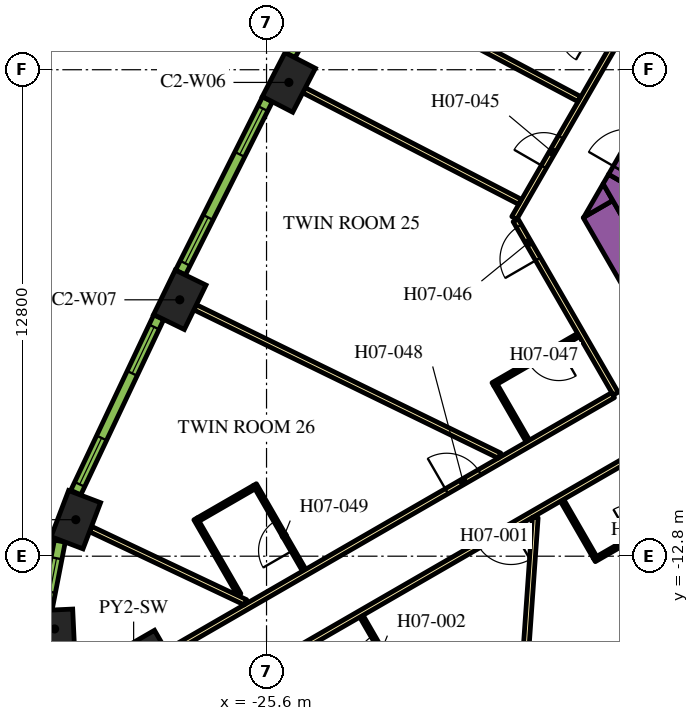
"""IFC4 building model, lengths in metres.
Left out: names, types, materials, properties, quantities, classifications, styles, units other than length and angle.
Written with IfcOpenShell. Run it as: python <this file> out.ifc"""

import sys

from ifc_helpers import new_model, si_unit, direction, frame, frame_2d, origin, origin_2d, place, context, subcontext, project, spatial, polyline, rectangle, outline, extrude, element, fill, save


model = new_model("IFC4")
c1 = context("Model", 3, precision=1e-05, world=origin(), true_north=direction((0.0, 1.0)))
c2 = subcontext(c1, "Body", "Model", "MODEL_VIEW")
j1 = project(units=[si_unit("LENGTHUNIT", "METRE"), si_unit("PLANEANGLEUNIT", "RADIAN")], contexts=[c1])
p1 = place(None, origin())
s1 = spatial("IfcSite", under=j1, at=p1, CompositionType="ELEMENT")
p2 = place(p1, origin())
s2 = spatial("IfcBuilding", under=s1, at=p2, CompositionType="ELEMENT")
p3 = place(p2, frame((0.0, 0.0, 103.2)))
s3 = spatial("IfcBuildingStorey", under=s2, at=p3, CompositionType="ELEMENT", Elevation=103.2)
p4 = place(p3, frame((-29.097, -16.799, 0.0), z_axis=(0.0, 0.0, 1.0), x_axis=(-0.866025403784, -0.5, 0.0)))
e1 = element("IfcColumn", 1, at=p4, inside=s3, PredefinedType="COLUMN", context=c2, shape_type="SweptSolid", body=[
    extrude(rectangle(XDim=3.0, YDim=3.0, at=origin_2d()), origin(), (0.0, 0.0, 1.0), 3.9),
])
for number, where, z_axis, x_axis in (
    (2, (-25.012, -0.334, 0.0), (0.0, 0.0, 1.0), (-0.459, -0.888, 0.0)),
    (3, (-27.883, -6.054, 0.0), (0.0, 0.0, 1.0), (-0.438, -0.899, 0.0)),
    (4, (-30.619, -11.839, 0.0), (0.0, 0.0, 1.0), (-0.355, -0.935, 0.0)),
):
    element("IfcColumn", number, at=place(p3, frame(where, z_axis=z_axis, x_axis=x_axis)), inside=s3, PredefinedType="COLUMN", context=c2, shape_type="SweptSolid", body=[
        extrude(rectangle(XDim=1.3, YDim=0.9, at=origin_2d()), origin(), (0.0, 0.0, 1.0), 3.9),
    ])
p5 = place(p3, frame((-31.177, -14.714, 0.0), z_axis=(0.0, 0.0, 1.0), x_axis=(0.046756026083, -0.998906338965, 0.0)))
e5 = element("IfcColumn", 5, at=p5, inside=s3, PredefinedType="COLUMN", context=c2, shape_type="SweptSolid", body=[
    extrude(rectangle(XDim=1.0, YDim=1.0, at=origin_2d()), origin(), (0.0, 0.0, 1.0), 3.9),
])
p6 = place(p3, frame((-12.134, -11.883, 0.0), z_axis=(0.0, 0.0, 1.0), x_axis=(-0.500005339912, 0.866022320763, 0.0)))
e6 = element("IfcWall", 6, at=p6, inside=s3, PredefinedType="SOLIDWALL", context=c2, shape_type="SweptSolid", body=[
    extrude(rectangle(XDim=9.488, YDim=0.9, at=frame_2d((4.744, 0.0))), origin(), (0.0, 0.0, 1.0), 3.9),
])
p7 = place(p3, origin())
e7 = element("IfcWall", 7, at=p7, inside=s3, PredefinedType="SOLIDWALL", context=c2, shape_type="SweptSolid", body=[
    extrude(outline(polyline([(-16.489, -3.44), (-17.251, -3.88), (-16.743, -3.0), (-16.489, -3.44)])), origin(), (0.0, 0.0, 1.0), 3.9),
])
e8 = element("IfcWall", 8, at=p7, inside=s3, PredefinedType="SOLIDWALL", context=c2, shape_type="SweptSolid", body=[
    extrude(outline(polyline([(-15.82, -3.201), (-16.223, -3.9), (-16.743, -3.0), (-16.599, -2.751), (-15.82, -3.201)])), origin(), (0.0, 0.0, 1.0), 3.9),
])
p8 = place(p3, frame((-16.209, -2.976, 0.0), z_axis=(0.0, 0.0, 1.0), x_axis=(0.499954529098, 0.86605165483, 0.0)))
e9 = element("IfcWall", 9, at=p8, inside=s3, PredefinedType="SOLIDWALL", context=c2, shape_type="SweptSolid", body=[
    extrude(rectangle(XDim=1.7, YDim=0.9, at=frame_2d((0.85, 0.0))), origin(), (0.0, 0.0, 1.0), 3.9),
])
p9 = place(p8, frame((0.25, 0.0, 0.0)))
e10 = element("IfcOpeningElement", 10, at=p9, cuts=e9, PredefinedType="OPENING", context=c2, shape_type="SweptSolid", body=[
    extrude(rectangle(XDim=1.2, YDim=2.1, at=frame_2d((0.6, 1.05))), frame((0.0, 0.46, 0.0), z_axis=(0.0, -1.0, 0.0), x_axis=(1.0, 0.0, 0.0)), (0.0, 0.0, 1.0), 0.92),
])
p10 = place(p3, frame((-19.081, -3.9, 0.0), z_axis=(0.0, 0.0, 1.0), x_axis=(0.499998313975, 0.866026377209, 0.0)))
e11 = element("IfcWall", 11, at=p10, inside=s3, PredefinedType="PARTITIONING", context=c2, shape_type="SweptSolid", body=[
    extrude(rectangle(XDim=25.766, YDim=0.15, at=frame_2d((12.883, 0.0))), origin(), (0.0, 0.0, 1.0), 2.75),
])
p11 = place(p10, frame((19.306, 0.0, 0.0)))
e12 = element("IfcOpeningElement", 12, at=p11, cuts=e11, PredefinedType="OPENING", context=c2, shape_type="SweptSolid", body=[
    extrude(rectangle(XDim=1.0, YDim=2.1, at=frame_2d((0.5, 1.05))), frame((0.0, 0.085, 0.0), z_axis=(0.0, -1.0, 0.0), x_axis=(1.0, 0.0, 0.0)), (0.0, 0.0, 1.0), 0.17),
])
p12 = place(p10, frame((17.144, 0.0, 0.0)))
e13 = element("IfcOpeningElement", 13, at=p12, cuts=e11, PredefinedType="OPENING", context=c2, shape_type="SweptSolid", body=[
    extrude(rectangle(XDim=0.9, YDim=2.1, at=frame_2d((0.45, 1.05))), frame((0.0, 0.085, 0.0), z_axis=(0.0, -1.0, 0.0), x_axis=(1.0, 0.0, 0.0)), (0.0, 0.0, 1.0), 0.17),
])
p13 = place(p10, frame((9.955, 0.0, 0.0)))
e14 = element("IfcOpeningElement", 14, at=p13, cuts=e11, PredefinedType="OPENING", context=c2, shape_type="SweptSolid", body=[
    extrude(rectangle(XDim=1.1, YDim=2.1, at=frame_2d((0.55, 1.05))), frame((0.0, 0.085, 0.0), z_axis=(0.0, -1.0, 0.0), x_axis=(1.0, 0.0, 0.0)), (0.0, 0.0, 1.0), 0.17),
])
p14 = place(p10, frame((8.648, 0.0, 0.0)))
e15 = element("IfcOpeningElement", 15, at=p14, cuts=e11, PredefinedType="OPENING", context=c2, shape_type="SweptSolid", body=[
    extrude(rectangle(XDim=1.0, YDim=2.1, at=frame_2d((0.5, 1.05))), frame((0.0, 0.085, 0.0), z_axis=(0.0, -1.0, 0.0), x_axis=(1.0, 0.0, 0.0)), (0.0, 0.0, 1.0), 0.17),
])
p15 = place(p10, frame((1.553, 0.0, 0.0)))
e16 = element("IfcOpeningElement", 16, at=p15, cuts=e11, PredefinedType="OPENING", context=c2, shape_type="SweptSolid", body=[
    extrude(rectangle(XDim=0.9, YDim=2.1, at=frame_2d((0.45, 1.05))), frame((0.0, 0.085, 0.0), z_axis=(0.0, -1.0, 0.0), x_axis=(1.0, 0.0, 0.0)), (0.0, 0.0, 1.0), 0.17),
])
p16 = place(p3, frame((-16.412, -8.523, 0.0), z_axis=(0.0, 0.0, 1.0), x_axis=(-0.500001929737, 0.866024289647, 0.0)))
e17 = element("IfcWall", 17, at=p16, inside=s3, PredefinedType="PARTITIONING", context=c2, shape_type="SweptSolid", body=[
    extrude(rectangle(XDim=5.268, YDim=0.15, at=frame_2d((2.634, 0.0))), origin(), (0.0, 0.0, 1.0), 2.75),
])
p17 = place(p16, frame((4.088, 0.0, 0.0)))
e18 = element("IfcOpeningElement", 18, at=p17, cuts=e17, PredefinedType="OPENING", context=c2, shape_type="SweptSolid", body=[
    extrude(rectangle(XDim=1.0, YDim=2.1, at=frame_2d((0.5, 1.05))), frame((0.0, 0.085, 0.0), z_axis=(0.0, -1.0, 0.0), x_axis=(1.0, 0.0, 0.0)), (0.0, 0.0, 1.0), 0.17),
])
p18 = place(p3, frame((-28.211, -15.335, 0.0), z_axis=(0.0, 0.0, 1.0), x_axis=(0.866025884867, 0.49999916674, 0.0)))
e19 = element("IfcWall", 19, at=p18, inside=s3, PredefinedType="PARTITIONING", context=c2, shape_type="SweptSolid", body=[
    extrude(rectangle(XDim=13.543, YDim=0.15, at=frame_2d((6.772, 0.0))), origin(), (0.0, 0.0, 1.0), 2.75),
])
p19 = place(p18, frame((8.488, 0.0, 0.0)))
e20 = element("IfcOpeningElement", 20, at=p19, cuts=e19, PredefinedType="OPENING", context=c2, shape_type="SweptSolid", body=[
    extrude(rectangle(XDim=1.0, YDim=2.1, at=frame_2d((0.5, 1.05))), frame((0.0, 0.085, 0.0), z_axis=(0.0, -1.0, 0.0), x_axis=(1.0, 0.0, 0.0)), (0.0, 0.0, 1.0), 0.17),
])
p20 = place(p3, frame((-15.587, -9.952, 0.0), z_axis=(0.0, 0.0, 1.0), x_axis=(-0.866017869832, -0.500013048961, 0.0)))
e21 = element("IfcWall", 21, at=p20, inside=s3, PredefinedType="PARTITIONING", context=c2, shape_type="SweptSolid", body=[
    extrude(rectangle(XDim=13.624, YDim=0.15, at=frame_2d((6.812, 0.0))), origin(), (0.0, 0.0, 1.0), 2.75),
])
p21 = place(p20, frame((4.134, 0.0, 0.0)))
e22 = element("IfcOpeningElement", 22, at=p21, cuts=e21, PredefinedType="OPENING", context=c2, shape_type="SweptSolid", body=[
    extrude(rectangle(XDim=1.0, YDim=2.1, at=frame_2d((0.5, 1.05))), frame((0.0, 0.085, 0.0), z_axis=(0.0, -1.0, 0.0), x_axis=(1.0, 0.0, 0.0)), (0.0, 0.0, 1.0), 0.17),
])
p22 = place(p3, frame((-30.231, -12.085, 0.0), z_axis=(0.0, 0.0, 1.0), x_axis=(0.904001132572, -0.427530060122, 0.0)))
e23 = element("IfcWall", 23, at=p22, inside=s3, PredefinedType="PARTITIONING", context=c2, shape_type="SweptSolid", body=[
    extrude(rectangle(XDim=4.51, YDim=0.15, at=frame_2d((2.255, 0.0))), origin(), (0.0, 0.0, 1.0), 2.75),
])
p23 = place(p3, frame((-27.479, -6.251, 0.0), z_axis=(0.0, 0.0, 1.0), x_axis=(0.898945877276, -0.438059710231, 0.0)))
e24 = element("IfcWall", 24, at=p23, inside=s3, PredefinedType="PARTITIONING", context=c2, shape_type="SweptSolid", body=[
    extrude(rectangle(XDim=8.909, YDim=0.15, at=frame_2d((4.455, 0.0))), origin(), (0.0, 0.0, 1.0), 2.75),
])
p24 = place(p3, frame((-24.613, -0.541, 0.0), z_axis=(0.0, 0.0, 1.0), x_axis=(0.888459912519, -0.458954228487, 0.0)))
e25 = element("IfcWall", 25, at=p24, inside=s3, PredefinedType="PARTITIONING", context=c2, shape_type="SweptSolid", body=[
    extrude(rectangle(XDim=6.392, YDim=0.15, at=frame_2d((3.196, 0.0))), origin(), (0.0, 0.0, 1.0), 2.75),
])
p25 = place(p3, frame((-19.153, -20.671, 0.0), z_axis=(0.0, 0.0, 1.0), x_axis=(0.070070736723, 0.997542025107, 0.0)))
e26 = element("IfcWall", 26, at=p25, inside=s3, PredefinedType="PARTITIONING", context=c2, shape_type="SweptSolid", body=[
    extrude(rectangle(XDim=8.909, YDim=0.15, at=frame_2d((4.455, 0.0))), origin(), (0.0, 0.0, 1.0), 2.75),
])
p26 = place(p3, frame((-23.652, 2.567, 0.0), z_axis=(0.0, 0.0, 1.0), x_axis=(0.883019237957, -0.469336793144, 0.0)))
e27 = element("IfcWall", 27, at=p26, inside=s3, PredefinedType="PARTITIONING", context=c2, shape_type="SweptSolid", body=[
    extrude(rectangle(XDim=7.111, YDim=0.15, at=frame_2d((3.555, 0.0))), origin(), (0.0, 0.0, 1.0), 2.75),
])
p27 = place(p3, frame((-21.704, -16.803, 0.0), z_axis=(0.0, 0.0, 1.0), x_axis=(-0.500049511043, 0.865996816683, 0.0)))
e28 = element("IfcWall", 28, at=p27, inside=s3, PredefinedType="PARTITIONING", context=c2, shape_type="SweptSolid", body=[
    extrude(rectangle(XDim=2.8, YDim=0.1, at=frame_2d((1.4, 0.0))), origin(), (0.0, 0.0, 1.0), 2.75),
])
p28 = place(p27, frame((1.3, 0.0, 0.0)))
e29 = element("IfcOpeningElement", 29, at=p28, cuts=e28, PredefinedType="OPENING", context=c2, shape_type="SweptSolid", body=[
    extrude(rectangle(XDim=0.9, YDim=2.1, at=frame_2d((0.45, 1.05))), frame((0.0, 0.06, 0.0), z_axis=(0.0, -1.0, 0.0), x_axis=(1.0, 0.0, 0.0)), (0.0, 0.0, 1.0), 0.12),
])
p29 = place(p3, frame((-16.974, -12.9, 0.0), z_axis=(0.0, 0.0, 1.0), x_axis=(0.865997922154, 0.500047596559, 0.0)))
e30 = element("IfcWall", 30, at=p29, inside=s3, PredefinedType="PARTITIONING", context=c2, shape_type="SweptSolid", body=[
    extrude(rectangle(XDim=2.6, YDim=0.1, at=frame_2d((1.3, 0.0))), origin(), (0.0, 0.0, 1.0), 2.75),
])
p30 = place(p29, frame((1.1, 0.0, 0.0)))
e31 = element("IfcOpeningElement", 31, at=p30, cuts=e30, PredefinedType="OPENING", context=c2, shape_type="SweptSolid", body=[
    extrude(rectangle(XDim=0.9, YDim=2.1, at=frame_2d((0.45, 1.05))), frame((0.0, 0.06, 0.0), z_axis=(0.0, -1.0, 0.0), x_axis=(1.0, 0.0, 0.0)), (0.0, 0.0, 1.0), 0.12),
])
p31 = place(p3, frame((-16.956, -12.832, 0.0), z_axis=(0.0, 0.0, 1.0), x_axis=(-0.499978980201, 0.866037539231, 0.0)))
e32 = element("IfcWall", 32, at=p31, inside=s3, PredefinedType="PARTITIONING", context=c2, shape_type="SweptSolid", body=[
    extrude(rectangle(XDim=1.73, YDim=0.1, at=frame_2d((0.865, 0.0))), origin(), (0.0, 0.0, 1.0), 2.75),
])
p32 = place(p3, frame((-17.39, -6.979, 0.0), z_axis=(0.0, 0.0, 1.0), x_axis=(-0.866021400173, -0.500006934395, 0.0)))
e33 = element("IfcWall", 33, at=p32, inside=s3, PredefinedType="PARTITIONING", context=c2, shape_type="SweptSolid", body=[
    extrude(rectangle(XDim=2.6, YDim=0.1, at=frame_2d((1.3, 0.0))), origin(), (0.0, 0.0, 1.0), 2.75),
])
p33 = place(p32, frame((0.6, 0.0, 0.0)))
e34 = element("IfcOpeningElement", 34, at=p33, cuts=e33, PredefinedType="OPENING", context=c2, shape_type="SweptSolid", body=[
    extrude(rectangle(XDim=0.9, YDim=2.1, at=frame_2d((0.45, 1.05))), frame((0.0, 0.06, 0.0), z_axis=(0.0, -1.0, 0.0), x_axis=(1.0, 0.0, 0.0)), (0.0, 0.0, 1.0), 0.12),
])
p34 = place(p3, frame((-19.574, -8.297, 0.0), z_axis=(0.0, 0.0, 1.0), x_axis=(0.500062241894, -0.865989465428, 0.0)))
e35 = element("IfcWall", 35, at=p34, inside=s3, PredefinedType="PARTITIONING", context=c2, shape_type="SweptSolid", body=[
    extrude(rectangle(XDim=1.7, YDim=0.1, at=frame_2d((0.85, 0.0))), origin(), (0.0, 0.0, 1.0), 2.75),
])
p35 = place(p3, frame((-24.61, -13.169, 0.0), z_axis=(0.0, 0.0, 1.0), x_axis=(-0.500006934395, 0.866021400173, 0.0)))
e36 = element("IfcWall", 36, at=p35, inside=s3, PredefinedType="PARTITIONING", context=c2, shape_type="SweptSolid", body=[
    extrude(rectangle(XDim=2.6, YDim=0.1, at=frame_2d((1.3, 0.0))), origin(), (0.0, 0.0, 1.0), 2.75),
])
p36 = place(p35, frame((0.6, 0.0, 0.0)))
e37 = element("IfcOpeningElement", 37, at=p36, cuts=e36, PredefinedType="OPENING", context=c2, shape_type="SweptSolid", body=[
    extrude(rectangle(XDim=0.9, YDim=2.1, at=frame_2d((0.45, 1.05))), frame((0.0, 0.06, 0.0), z_axis=(0.0, -1.0, 0.0), x_axis=(1.0, 0.0, 0.0)), (0.0, 0.0, 1.0), 0.12),
])
p37 = place(p3, frame((-25.928, -10.986, 0.0), z_axis=(0.0, 0.0, 1.0), x_axis=(-0.865989465428, -0.500062241894, 0.0)))
e38 = element("IfcWall", 38, at=p37, inside=s3, PredefinedType="PARTITIONING", context=c2, shape_type="SweptSolid", body=[
    extrude(rectangle(XDim=1.7, YDim=0.1, at=frame_2d((0.85, 0.0))), origin(), (0.0, 0.0, 1.0), 2.75),
])
p38 = place(p3, frame((-26.319, -13.81, 0.0), z_axis=(0.0, 0.0, 1.0), x_axis=(-0.499952165731, 0.866053019151, 0.0)))
e39 = element("IfcWall", 39, at=p38, inside=s3, PredefinedType="PARTITIONING", context=c2, shape_type="SweptSolid", body=[
    extrude(rectangle(XDim=2.3, YDim=0.1, at=frame_2d((1.15, 0.0))), origin(), (0.0, 0.0, 1.0), 2.75),
])
p39 = place(p3, frame((-22.583, 4.887, 0.0), z_axis=(0.0, 0.0, 1.0), x_axis=(-0.469323203119, -0.883026461106, 0.0)))
e40 = element("IfcWall", 40, at=p39, inside=s3, PredefinedType="SOLIDWALL", context=c2, shape_type="SweptSolid", body=[
    extrude(rectangle(XDim=5.101, YDim=0.29, at=frame_2d((2.55, 0.0))), origin(), (0.0, 0.0, 1.0), 3.65),
])
p40 = place(p39, frame((0.273, 0.0, 0.9)))
e41 = element("IfcOpeningElement", 41, at=p40, cuts=e40, PredefinedType="OPENING", context=c2, shape_type="SweptSolid", body=[
    extrude(rectangle(XDim=1.35, YDim=2.15, at=frame_2d((0.675, 1.075))), frame((0.0, 0.155, 0.0), z_axis=(0.0, -1.0, 0.0), x_axis=(1.0, 0.0, 0.0)), (0.0, 0.0, 1.0), 0.31),
])
p41 = place(p39, frame((3.478, 0.0, 0.9)))
e42 = element("IfcOpeningElement", 42, at=p41, cuts=e40, PredefinedType="OPENING", context=c2, shape_type="SweptSolid", body=[
    extrude(rectangle(XDim=1.35, YDim=2.15, at=frame_2d((0.675, 1.075))), frame((0.0, 0.155, 0.0), z_axis=(0.0, -1.0, 0.0), x_axis=(1.0, 0.0, 0.0)), (0.0, 0.0, 1.0), 0.31),
])
p42 = place(p3, frame((-25.576, -0.778, 0.0), z_axis=(0.0, 0.0, 1.0), x_axis=(-0.448534297211, -0.893765620409, 0.0)))
e43 = element("IfcWall", 43, at=p42, inside=s3, PredefinedType="SOLIDWALL", context=c2, shape_type="SweptSolid", body=[
    extrude(rectangle(XDim=5.1, YDim=0.29, at=frame_2d((2.55, 0.0))), origin(), (0.0, 0.0, 1.0), 3.65),
])
p43 = place(p42, frame((0.272, 0.0, 0.9)))
e44 = element("IfcOpeningElement", 44, at=p43, cuts=e43, PredefinedType="OPENING", context=c2, shape_type="SweptSolid", body=[
    extrude(rectangle(XDim=1.35, YDim=2.15, at=frame_2d((0.675, 1.075))), frame((0.0, 0.155, 0.0), z_axis=(0.0, -1.0, 0.0), x_axis=(1.0, 0.0, 0.0)), (0.0, 0.0, 1.0), 0.31),
])
p44 = place(p42, frame((3.478, 0.0, 0.9)))
e45 = element("IfcOpeningElement", 45, at=p44, cuts=e43, PredefinedType="OPENING", context=c2, shape_type="SweptSolid", body=[
    extrude(rectangle(XDim=1.35, YDim=2.15, at=frame_2d((0.675, 1.075))), frame((0.0, 0.155, 0.0), z_axis=(0.0, -1.0, 0.0), x_axis=(1.0, 0.0, 0.0)), (0.0, 0.0, 1.0), 0.31),
])
p45 = place(p3, frame((-28.436, -6.511, 0.0), z_axis=(0.0, 0.0, 1.0), x_axis=(-0.427543726596, -0.903994669148, 0.0)))
e46 = element("IfcWall", 46, at=p45, inside=s3, PredefinedType="SOLIDWALL", context=c2, shape_type="SweptSolid", body=[
    extrude(rectangle(XDim=5.107, YDim=0.29, at=frame_2d((2.553, 0.0))), origin(), (0.0, 0.0, 1.0), 3.65),
])
p46 = place(p45, frame((0.285, 0.0, 0.9)))
e47 = element("IfcOpeningElement", 47, at=p46, cuts=e46, PredefinedType="OPENING", context=c2, shape_type="SweptSolid", body=[
    extrude(rectangle(XDim=1.35, YDim=2.15, at=frame_2d((0.675, 1.075))), frame((0.0, 0.155, 0.0), z_axis=(0.0, -1.0, 0.0), x_axis=(1.0, 0.0, 0.0)), (0.0, 0.0, 1.0), 0.31),
])
p47 = place(p45, frame((3.516, 0.0, 0.9)))
e48 = element("IfcOpeningElement", 48, at=p47, cuts=e46, PredefinedType="OPENING", context=c2, shape_type="SweptSolid", body=[
    extrude(rectangle(XDim=1.35, YDim=2.15, at=frame_2d((0.675, 1.075))), frame((0.0, 0.155, 0.0), z_axis=(0.0, -1.0, 0.0), x_axis=(1.0, 0.0, 0.0)), (0.0, 0.0, 1.0), 0.31),
])
p48 = place(p3, frame((-31.039, -12.403, 0.0), z_axis=(0.0, 0.0, 1.0), x_axis=(-0.190409913989, -0.981704672829, 0.0)))
e49 = element("IfcWall", 49, at=p48, inside=s3, PredefinedType="SOLIDWALL", context=c2, shape_type="SweptSolid", body=[
    extrude(rectangle(XDim=1.819, YDim=0.29, at=frame_2d((0.91, 0.0))), origin(), (0.0, 0.0, 1.0), 3.65),
])
p49 = place(p48, frame((0.46, 0.0, 0.9)))
e50 = element("IfcOpeningElement", 50, at=p49, cuts=e49, PredefinedType="OPENING", context=c2, shape_type="SweptSolid", body=[
    extrude(rectangle(XDim=0.9, YDim=2.15, at=frame_2d((0.45, 1.075))), frame((0.0, 0.155, 0.0), z_axis=(0.0, -1.0, 0.0), x_axis=(1.0, 0.0, 0.0)), (0.0, 0.0, 1.0), 0.31),
])
p50 = place(p21, origin())
e51 = element("IfcDoor", 51, at=p50, inside=s3, OperationType="SINGLE_SWING_LEFT", PredefinedType="DOOR", context=c2, shape_type="SweptSolid", body=[
    extrude(rectangle(XDim=1.0, YDim=2.1, at=frame_2d((0.5, 1.05))), frame((0.0, 0.025, 0.0), z_axis=(0.0, -1.0, 0.0), x_axis=(1.0, 0.0, 0.0)), (0.0, 0.0, 1.0), 0.05),
])
fill(e22, e51)
p51 = place(p28, origin())
e52 = element("IfcDoor", 52, at=p51, inside=s3, OperationType="SINGLE_SWING_LEFT", PredefinedType="DOOR", context=c2, shape_type="SweptSolid", body=[
    extrude(rectangle(XDim=0.9, YDim=2.1, at=frame_2d((0.45, 1.05))), frame((0.0, 0.025, 0.0), z_axis=(0.0, -1.0, 0.0), x_axis=(1.0, 0.0, 0.0)), (0.0, 0.0, 1.0), 0.05),
])
fill(e29, e52)
p52 = place(p15, origin())
e53 = element("IfcDoor", 53, at=p52, inside=s3, OperationType="SINGLE_SWING_RIGHT", PredefinedType="DOOR", context=c2, shape_type="SweptSolid", body=[
    extrude(rectangle(XDim=0.9, YDim=2.1, at=frame_2d((0.45, 1.05))), frame((0.0, 0.025, 0.0), z_axis=(0.0, -1.0, 0.0), x_axis=(1.0, 0.0, 0.0)), (0.0, 0.0, 1.0), 0.05),
])
fill(e16, e53)
p53 = place(p17, origin())
e54 = element("IfcDoor", 54, at=p53, inside=s3, OperationType="SINGLE_SWING_RIGHT", PredefinedType="DOOR", context=c2, shape_type="SweptSolid", body=[
    extrude(rectangle(XDim=1.0, YDim=2.1, at=frame_2d((0.5, 1.05))), frame((0.0, 0.025, 0.0), z_axis=(0.0, -1.0, 0.0), x_axis=(1.0, 0.0, 0.0)), (0.0, 0.0, 1.0), 0.05),
])
fill(e18, e54)
p54 = place(p33, origin())
e55 = element("IfcDoor", 55, at=p54, inside=s3, OperationType="SINGLE_SWING_LEFT", PredefinedType="DOOR", context=c2, shape_type="SweptSolid", body=[
    extrude(rectangle(XDim=0.9, YDim=2.1, at=frame_2d((0.45, 1.05))), frame((0.0, 0.025, 0.0), z_axis=(0.0, -1.0, 0.0), x_axis=(1.0, 0.0, 0.0)), (0.0, 0.0, 1.0), 0.05),
])
fill(e34, e55)
p55 = place(p19, origin())
e56 = element("IfcDoor", 56, at=p55, inside=s3, OperationType="SINGLE_SWING_RIGHT", PredefinedType="DOOR", context=c2, shape_type="SweptSolid", body=[
    extrude(rectangle(XDim=1.0, YDim=2.1, at=frame_2d((0.5, 1.05))), frame((0.0, 0.025, 0.0), z_axis=(0.0, -1.0, 0.0), x_axis=(1.0, 0.0, 0.0)), (0.0, 0.0, 1.0), 0.05),
])
fill(e20, e56)
p56 = place(p36, origin())
e57 = element("IfcDoor", 57, at=p56, inside=s3, OperationType="SINGLE_SWING_LEFT", PredefinedType="DOOR", context=c2, shape_type="SweptSolid", body=[
    extrude(rectangle(XDim=0.9, YDim=2.1, at=frame_2d((0.45, 1.05))), frame((0.0, 0.025, 0.0), z_axis=(0.0, -1.0, 0.0), x_axis=(1.0, 0.0, 0.0)), (0.0, 0.0, 1.0), 0.05),
])
fill(e37, e57)
p57 = place(p43, origin())
e58 = element("IfcWindow", 58, at=p57, inside=s3, PartitioningType="DOUBLE_PANEL_VERTICAL", PredefinedType="WINDOW", context=c2, shape_type="SweptSolid", body=[
    extrude(rectangle(XDim=1.35, YDim=2.15, at=frame_2d((0.675, 1.075))), frame((0.0, 0.015, 0.0), z_axis=(0.0, -1.0, 0.0), x_axis=(1.0, 0.0, 0.0)), (0.0, 0.0, 1.0), 0.06),
])
fill(e44, e58)
p58 = place(p44, origin())
e59 = element("IfcWindow", 59, at=p58, inside=s3, PartitioningType="DOUBLE_PANEL_VERTICAL", PredefinedType="WINDOW", context=c2, shape_type="SweptSolid", body=[
    extrude(rectangle(XDim=1.35, YDim=2.15, at=frame_2d((0.675, 1.075))), frame((0.0, 0.015, 0.0), z_axis=(0.0, -1.0, 0.0), x_axis=(1.0, 0.0, 0.0)), (0.0, 0.0, 1.0), 0.06),
])
fill(e45, e59)
p59 = place(p46, origin())
e60 = element("IfcWindow", 60, at=p59, inside=s3, PartitioningType="DOUBLE_PANEL_VERTICAL", PredefinedType="WINDOW", context=c2, shape_type="SweptSolid", body=[
    extrude(rectangle(XDim=1.35, YDim=2.15, at=frame_2d((0.675, 1.075))), frame((0.0, 0.015, 0.0), z_axis=(0.0, -1.0, 0.0), x_axis=(1.0, 0.0, 0.0)), (0.0, 0.0, 1.0), 0.06),
])
fill(e47, e60)
p60 = place(p47, origin())
e61 = element("IfcWindow", 61, at=p60, inside=s3, PartitioningType="DOUBLE_PANEL_VERTICAL", PredefinedType="WINDOW", context=c2, shape_type="SweptSolid", body=[
    extrude(rectangle(XDim=1.35, YDim=2.15, at=frame_2d((0.675, 1.075))), frame((0.0, 0.015, 0.0), z_axis=(0.0, -1.0, 0.0), x_axis=(1.0, 0.0, 0.0)), (0.0, 0.0, 1.0), 0.06),
])
fill(e48, e61)
p61 = place(p49, origin())
e62 = element("IfcWindow", 62, at=p61, inside=s3, PartitioningType="SINGLE_PANEL", PredefinedType="WINDOW", context=c2, shape_type="SweptSolid", body=[
    extrude(rectangle(XDim=0.9, YDim=2.15, at=frame_2d((0.45, 1.075))), frame((0.0, 0.015, 0.0), z_axis=(0.0, -1.0, 0.0), x_axis=(1.0, 0.0, 0.0)), (0.0, 0.0, 1.0), 0.06),
])
fill(e50, e62)
save(model, sys.argv[1])
